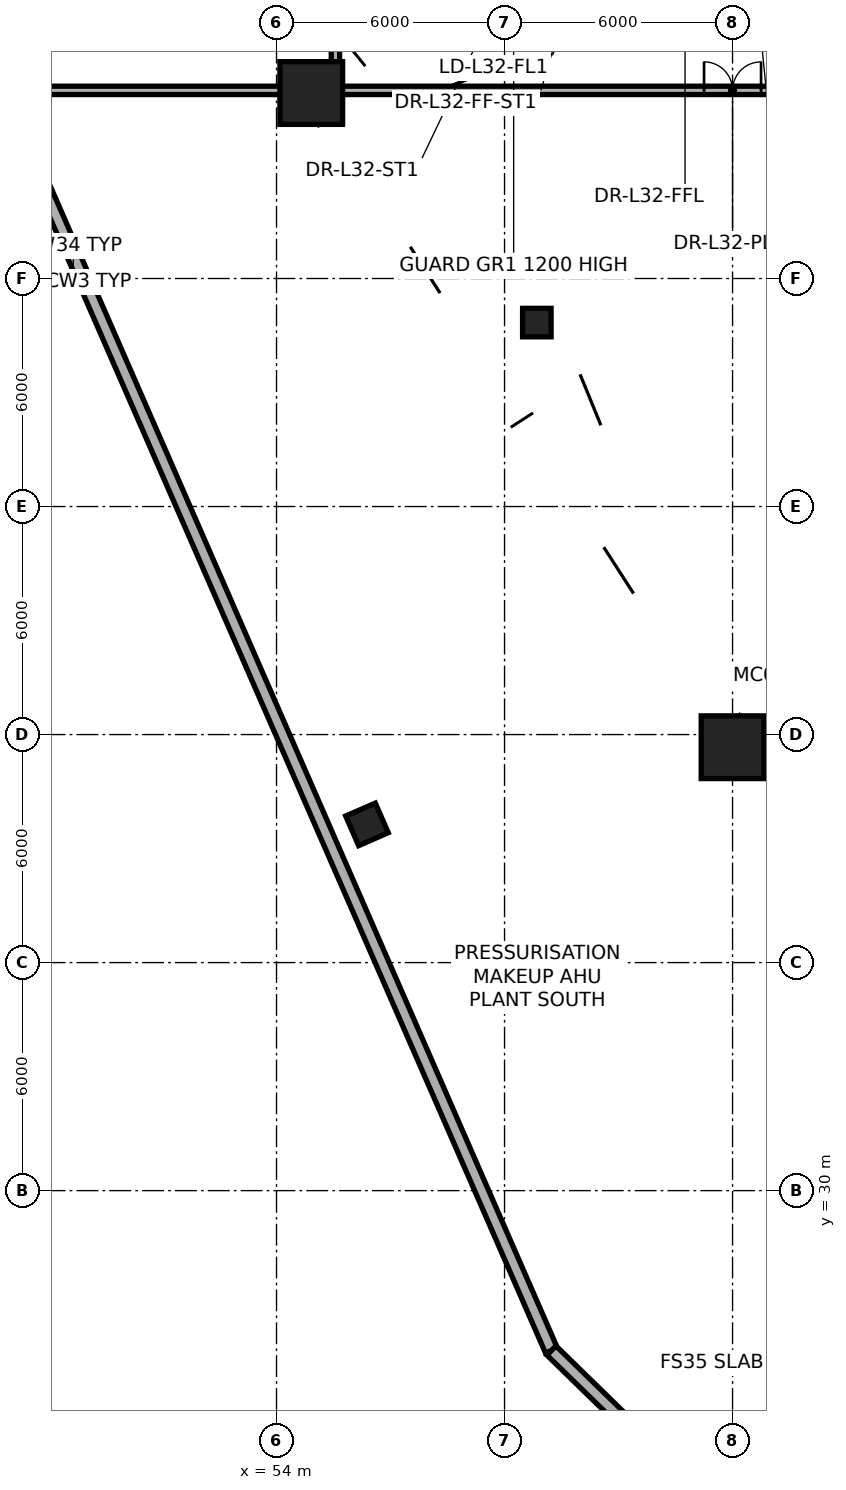
"""IFC4 building model, lengths in metres.
Left out: names, types, materials, properties, quantities, classifications, styles, units other than length and angle.
Written with IfcOpenShell. Run it as: python <this file> out.ifc"""

import sys

from ifc_helpers import new_model, si_unit, direction, frame, frame_2d, origin, origin_2d, place, context, subcontext, project, spatial, rectangle, extrude, element, fill, save


model = new_model("IFC4")
c1 = context("Model", 3, precision=1e-05, world=origin(), true_north=direction((0.0, 1.0)))
c2 = subcontext(c1, "Body", "Model", "MODEL_VIEW")
j1 = project(units=[si_unit("LENGTHUNIT", "METRE"), si_unit("PLANEANGLEUNIT", "RADIAN")], contexts=[c1])
p1 = place(None, origin())
s1 = spatial("IfcSite", under=j1, at=p1, CompositionType="ELEMENT")
p2 = place(p1, origin())
s2 = spatial("IfcBuilding", under=s1, at=p2, CompositionType="ELEMENT")
p3 = place(p2, frame((0.0, 0.0, 123.0)))
s3 = spatial("IfcBuildingStorey", under=s2, at=p3, CompositionType="ELEMENT", Elevation=123.0)
p4 = place(p3, frame((60.85, 52.84, 0.0), z_axis=(0.0, 0.0, 1.0), x_axis=(1.0, 0.0, 0.0)))
e1 = element("IfcColumn", 1, at=p4, inside=s3, PredefinedType="COLUMN", context=c2, shape_type="SweptSolid", body=[
    extrude(rectangle(XDim=0.75, YDim=0.75, at=origin_2d()), origin(), (0.0, 0.0, 1.0), 4.2),
])
for number, where, z_axis, x_axis in (
    (2, (66.0, 41.667, 0.0), (0.0, 0.0, 1.0), (1.0, 0.0, 0.0)),
    (3, (54.914, 58.88, 0.0), (0.0, 0.0, 1.0), (1.0, 0.0, 0.0)),
):
    element("IfcColumn", number, at=place(p3, frame(where, z_axis=z_axis, x_axis=x_axis)), inside=s3, PredefinedType="COLUMN", context=c2, shape_type="SweptSolid", body=[
        extrude(rectangle(XDim=1.65, YDim=1.65, at=origin_2d()), origin(), (0.0, 0.0, 1.0), 4.2),
    ])
p5 = place(p3, frame((56.358, 39.537, 0.003), z_axis=(0.010698135619, 0.047327621707, 0.998822129369), x_axis=(-0.188436729904, 0.981078053525, -0.044468547486)))
e4 = element("IfcColumn", 4, at=p5, inside=s3, PredefinedType="COLUMN", context=c2, shape_type="SweptSolid", body=[
    extrude(rectangle(XDim=0.85, YDim=0.85, at=origin_2d()), origin(), (0.0, 0.0, 1.0), 4.199),
])
p6 = place(p3, frame((61.234, 25.793, 0.0), z_axis=(0.0, 0.0, 1.0), x_axis=(-0.400059849946, 0.916489016007, 0.0)))
e5 = element("IfcWall", 5, at=p6, inside=s3, PredefinedType="STANDARD", context=c2, shape_type="SweptSolid", body=[
    extrude(rectangle(XDim=61.299, YDim=0.34, at=frame_2d((30.649, 0.0))), origin(), (0.0, 0.0, 1.0), 0.85),
])
p7 = place(p3, frame((64.04, 23.057, 0.0), z_axis=(0.0, 0.0, 1.0), x_axis=(-0.715927743937, 0.69817438041, 0.0)))
e6 = element("IfcWall", 6, at=p7, inside=s3, PredefinedType="STANDARD", context=c2, shape_type="SweptSolid", body=[
    extrude(rectangle(XDim=3.919, YDim=0.34, at=frame_2d((1.959, 0.0))), origin(), (0.0, 0.0, 1.0), 3.925),
])
p8 = place(p3, frame((46.854, 58.95, 0.0), z_axis=(0.0, 0.0, 1.0), x_axis=(1.0, 0.0, 0.0)))
e7 = element("IfcWall", 7, at=p8, inside=s3, PredefinedType="PARTITIONING", context=c2, shape_type="SweptSolid", body=[
    extrude(rectangle(XDim=8.697, YDim=0.22, at=frame_2d((4.348, 0.0))), origin(), (0.0, 0.0, 1.0), 3.055),
])
p9 = place(p3, frame((55.55, 58.95, 0.0), z_axis=(0.0, 0.0, 1.0), x_axis=(1.0, 0.0, 0.0)))
e8 = element("IfcWall", 8, at=p9, inside=s3, PredefinedType="PARTITIONING", context=c2, shape_type="SweptSolid", body=[
    extrude(rectangle(XDim=20.9, YDim=0.22, at=frame_2d((10.45, 0.0))), origin(), (0.0, 0.0, 1.0), 3.255),
])
p10 = place(p9, frame((9.7, 0.0, 0.0)))
e9 = element("IfcOpeningElement", 9, at=p10, cuts=e8, PredefinedType="OPENING", context=c2, shape_type="SweptSolid", body=[
    extrude(rectangle(XDim=1.5, YDim=2.2, at=frame_2d((0.75, 1.1))), frame((0.0, 0.12, 0.0), z_axis=(0.0, -1.0, 0.0), x_axis=(1.0, 0.0, 0.0)), (0.0, 0.0, 1.0), 0.24),
])
p11 = place(p3, frame((55.55, 58.95, 0.0), z_axis=(0.0, 0.0, 1.0), x_axis=(0.0, 1.0, 0.0)))
e10 = element("IfcWall", 10, at=p11, inside=s3, PredefinedType="PARTITIONING", context=c2, shape_type="SweptSolid", body=[
    extrude(rectangle(XDim=18.1, YDim=0.22, at=frame_2d((9.05, 0.0))), origin(), (0.0, 0.0, 1.0), 3.255),
])
p12 = place(p11, frame((7.34, 0.0, 0.0)))
e11 = element("IfcOpeningElement", 11, at=p12, cuts=e10, PredefinedType="OPENING", context=c2, shape_type="SweptSolid", body=[
    extrude(rectangle(XDim=1.05, YDim=2.15, at=frame_2d((0.525, 1.075))), frame((0.0, 0.12, 0.0), z_axis=(0.0, -1.0, 0.0), x_axis=(1.0, 0.0, 0.0)), (0.0, 0.0, 1.0), 0.24),
])
p13 = place(p11, frame((14.15, 0.0, 0.0)))
e12 = element("IfcOpeningElement", 12, at=p13, cuts=e10, PredefinedType="OPENING", context=c2, shape_type="SweptSolid", body=[
    extrude(rectangle(XDim=1.05, YDim=2.15, at=frame_2d((0.525, 1.075))), frame((0.0, 0.12, 0.0), z_axis=(0.0, -1.0, 0.0), x_axis=(1.0, 0.0, 0.0)), (0.0, 0.0, 1.0), 0.24),
])
p14 = place(p10, origin())
e13 = element("IfcDoor", 13, at=p14, inside=s3, OperationType="DOUBLE_DOOR_SINGLE_SWING", PredefinedType="DOOR", context=c2, shape_type="SweptSolid", body=[
    extrude(rectangle(XDim=1.5, YDim=2.2, at=frame_2d((0.75, 1.1))), frame((0.0, 0.025, 0.0), z_axis=(0.0, -1.0, 0.0), x_axis=(1.0, 0.0, 0.0)), (0.0, 0.0, 1.0), 0.05),
])
fill(e9, e13)
save(model, sys.argv[1])
